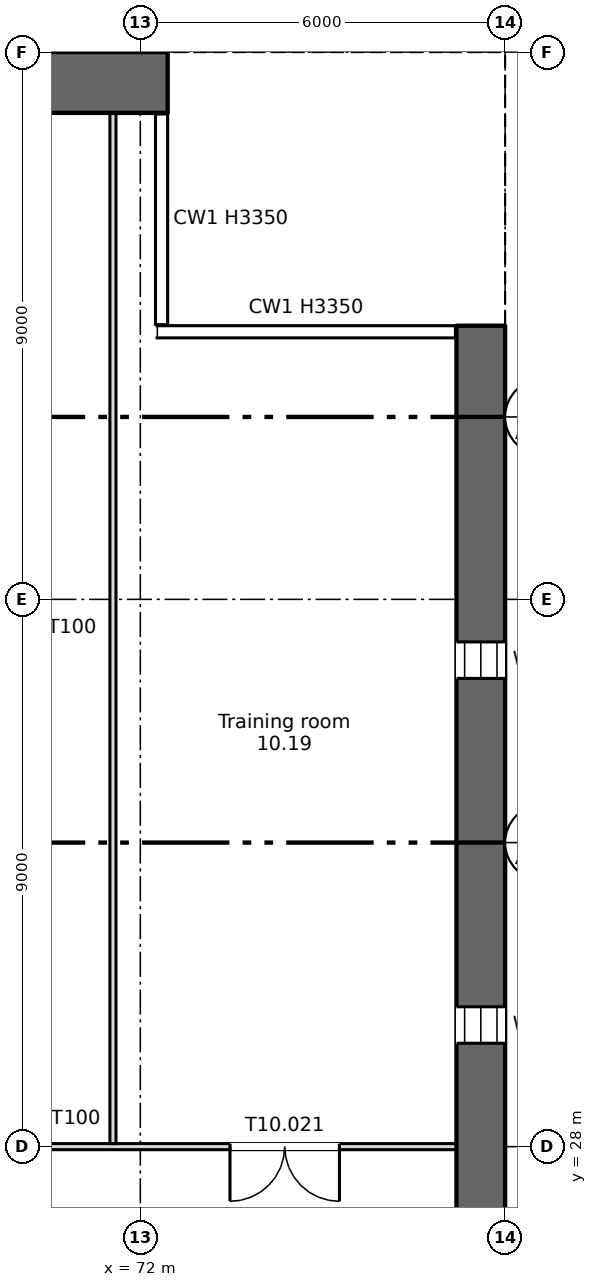
"""IFC4 building model, lengths in metres.
Left out: names, types, materials, properties, quantities, classifications, styles, units other than length and angle.
Written with IfcOpenShell. Run it as: python <this file> out.ifc"""

import sys

from ifc_helpers import new_model, si_unit, direction, frame, frame_2d, origin, place, context, subcontext, project, spatial, rectangle, extrude, element, fill, save


model = new_model("IFC4")
c1 = context("Model", 3, precision=1e-05, world=origin(), true_north=direction((0.0, 1.0)))
c2 = subcontext(c1, "Body", "Model", "MODEL_VIEW")
j1 = project(units=[si_unit("LENGTHUNIT", "METRE"), si_unit("PLANEANGLEUNIT", "RADIAN")], contexts=[c1])
p1 = place(None, origin())
s1 = spatial("IfcSite", under=j1, at=p1, CompositionType="ELEMENT")
p2 = place(p1, origin())
s2 = spatial("IfcBuilding", under=s1, at=p2, CompositionType="ELEMENT")
p3 = place(p2, frame((0.0, 0.0, 45.0)))
s3 = spatial("IfcBuildingStorey", under=s2, at=p3, CompositionType="ELEMENT", Elevation=45.0)
p4 = place(p3, frame((77.6, 4.5, 0.0), z_axis=(0.0, 0.0, 1.0), x_axis=(0.0, 1.0, 0.0)))
e1 = element("IfcWall", 1, at=p4, inside=s3, PredefinedType="SHEAR", context=c2, shape_type="SweptSolid", body=[
    extrude(rectangle(XDim=37.0, YDim=0.8, at=frame_2d((18.5, 0.0))), origin(), (0.0, 0.0, 1.0), 3.35),
])
p5 = place(p4, frame((1.2, 0.0, 0.6)))
e2 = element("IfcOpeningElement", 2, at=p5, cuts=e1, PredefinedType="OPENING", context=c2, shape_type="SweptSolid", body=[
    extrude(rectangle(XDim=0.6, YDim=2.4, at=frame_2d((0.3, 1.2))), frame((0.0, 0.41, 0.0), z_axis=(0.0, -1.0, 0.0), x_axis=(1.0, 0.0, 0.0)), (0.0, 0.0, 1.0), 0.82),
])
p6 = place(p4, frame((7.2, 0.0, 0.6)))
e3 = element("IfcOpeningElement", 3, at=p6, cuts=e1, PredefinedType="OPENING", context=c2, shape_type="SweptSolid", body=[
    extrude(rectangle(XDim=0.6, YDim=2.4, at=frame_2d((0.3, 1.2))), frame((0.0, 0.41, 0.0), z_axis=(0.0, -1.0, 0.0), x_axis=(1.0, 0.0, 0.0)), (0.0, 0.0, 1.0), 0.82),
])
p7 = place(p4, frame((13.2, 0.0, 0.6)))
e4 = element("IfcOpeningElement", 4, at=p7, cuts=e1, PredefinedType="OPENING", context=c2, shape_type="SweptSolid", body=[
    extrude(rectangle(XDim=0.6, YDim=2.4, at=frame_2d((0.3, 1.2))), frame((0.0, 0.41, 0.0), z_axis=(0.0, -1.0, 0.0), x_axis=(1.0, 0.0, 0.0)), (0.0, 0.0, 1.0), 0.82),
])
p8 = place(p4, frame((19.2, 0.0, 0.6)))
e5 = element("IfcOpeningElement", 5, at=p8, cuts=e1, PredefinedType="OPENING", context=c2, shape_type="SweptSolid", body=[
    extrude(rectangle(XDim=0.6, YDim=2.4, at=frame_2d((0.3, 1.2))), frame((0.0, 0.41, 0.0), z_axis=(0.0, -1.0, 0.0), x_axis=(1.0, 0.0, 0.0)), (0.0, 0.0, 1.0), 0.82),
])
p9 = place(p4, frame((25.2, 0.0, 0.6)))
e6 = element("IfcOpeningElement", 6, at=p9, cuts=e1, PredefinedType="OPENING", context=c2, shape_type="SweptSolid", body=[
    extrude(rectangle(XDim=0.6, YDim=2.4, at=frame_2d((0.3, 1.2))), frame((0.0, 0.41, 0.0), z_axis=(0.0, -1.0, 0.0), x_axis=(1.0, 0.0, 0.0)), (0.0, 0.0, 1.0), 0.82),
])
p10 = place(p4, frame((31.2, 0.0, 0.6)))
e7 = element("IfcOpeningElement", 7, at=p10, cuts=e1, PredefinedType="OPENING", context=c2, shape_type="SweptSolid", body=[
    extrude(rectangle(XDim=0.6, YDim=2.4, at=frame_2d((0.3, 1.2))), frame((0.0, 0.41, 0.0), z_axis=(0.0, -1.0, 0.0), x_axis=(1.0, 0.0, 0.0)), (0.0, 0.0, 1.0), 0.82),
])
p11 = place(p3, frame((5.55, 45.5, 0.0), z_axis=(0.0, 0.0, 1.0), x_axis=(1.0, 0.0, 0.0)))
e8 = element("IfcWall", 8, at=p11, inside=s3, PredefinedType="SHEAR", context=c2, shape_type="SweptSolid", body=[
    extrude(rectangle(XDim=66.9, YDim=1.0, at=frame_2d((33.45, 0.0))), origin(), (0.0, 0.0, 1.0), 3.35),
])
p12 = place(p11, frame((1.2, 0.0, 0.6)))
e9 = element("IfcOpeningElement", 9, at=p12, cuts=e8, PredefinedType="OPENING", context=c2, shape_type="SweptSolid", body=[
    extrude(rectangle(XDim=0.6, YDim=2.4, at=frame_2d((0.3, 1.2))), frame((0.0, 0.51, 0.0), z_axis=(0.0, -1.0, 0.0), x_axis=(1.0, 0.0, 0.0)), (0.0, 0.0, 1.0), 1.02),
])
p13 = place(p11, frame((7.2, 0.0, 0.6)))
e10 = element("IfcOpeningElement", 10, at=p13, cuts=e8, PredefinedType="OPENING", context=c2, shape_type="SweptSolid", body=[
    extrude(rectangle(XDim=0.6, YDim=2.4, at=frame_2d((0.3, 1.2))), frame((0.0, 0.51, 0.0), z_axis=(0.0, -1.0, 0.0), x_axis=(1.0, 0.0, 0.0)), (0.0, 0.0, 1.0), 1.02),
])
p14 = place(p11, frame((55.2, 0.0, 0.6)))
e11 = element("IfcOpeningElement", 11, at=p14, cuts=e8, PredefinedType="OPENING", context=c2, shape_type="SweptSolid", body=[
    extrude(rectangle(XDim=0.6, YDim=2.4, at=frame_2d((0.3, 1.2))), frame((0.0, 0.51, 0.0), z_axis=(0.0, -1.0, 0.0), x_axis=(1.0, 0.0, 0.0)), (0.0, 0.0, 1.0), 1.02),
])
p15 = place(p11, frame((61.2, 0.0, 0.6)))
e12 = element("IfcOpeningElement", 12, at=p15, cuts=e8, PredefinedType="OPENING", context=c2, shape_type="SweptSolid", body=[
    extrude(rectangle(XDim=0.6, YDim=2.4, at=frame_2d((0.3, 1.2))), frame((0.0, 0.51, 0.0), z_axis=(0.0, -1.0, 0.0), x_axis=(1.0, 0.0, 0.0)), (0.0, 0.0, 1.0), 1.02),
])
p16 = place(p3, frame((64.5, 28.0, 0.0), z_axis=(0.0, 0.0, 1.0), x_axis=(1.0, 0.0, 0.0)))
e13 = element("IfcWall", 13, at=p16, inside=s3, PredefinedType="PARTITIONING", context=c2, shape_type="SweptSolid", body=[
    extrude(rectangle(XDim=12.7, YDim=0.1, at=frame_2d((6.35, 0.0))), origin(), (0.0, 0.0, 1.0), 3.35),
])
p17 = place(p16, frame((8.975, 0.0, 0.0)))
e14 = element("IfcOpeningElement", 14, at=p17, cuts=e13, PredefinedType="OPENING", context=c2, shape_type="SweptSolid", body=[
    extrude(rectangle(XDim=1.8, YDim=2.1, at=frame_2d((0.9, 1.05))), frame((0.0, 0.06, 0.0), z_axis=(0.0, -1.0, 0.0), x_axis=(1.0, 0.0, 0.0)), (0.0, 0.0, 1.0), 0.12),
])
p18 = place(p16, frame((2.625, 0.0, 0.0)))
e15 = element("IfcOpeningElement", 15, at=p18, cuts=e13, PredefinedType="OPENING", context=c2, shape_type="SweptSolid", body=[
    extrude(rectangle(XDim=1.8, YDim=2.1, at=frame_2d((0.9, 1.05))), frame((0.0, 0.06, 0.0), z_axis=(0.0, -1.0, 0.0), x_axis=(1.0, 0.0, 0.0)), (0.0, 0.0, 1.0), 0.12),
])
p19 = place(p3, frame((71.55, 28.05, 0.0), z_axis=(0.0, 0.0, 1.0), x_axis=(0.0, 1.0, 0.0)))
e16 = element("IfcWall", 16, at=p19, inside=s3, PredefinedType="PARTITIONING", context=c2, shape_type="SweptSolid", body=[
    extrude(rectangle(XDim=16.95, YDim=0.1, at=frame_2d((8.475, 0.0))), origin(), (0.0, 0.0, 1.0), 3.35),
])
p20 = place(p9, origin())
e17 = element("IfcWindow", 17, at=p20, inside=s3, PartitioningType="SINGLE_PANEL", PredefinedType="WINDOW", context=c2, shape_type="SweptSolid", body=[
    extrude(rectangle(XDim=0.6, YDim=2.4, at=frame_2d((0.3, 1.2))), frame((0.0, 0.03, 0.0), z_axis=(0.0, -1.0, 0.0), x_axis=(1.0, 0.0, 0.0)), (0.0, 0.0, 1.0), 0.06),
])
fill(e6, e17)
p21 = place(p10, origin())
e18 = element("IfcWindow", 18, at=p21, inside=s3, PartitioningType="SINGLE_PANEL", PredefinedType="WINDOW", context=c2, shape_type="SweptSolid", body=[
    extrude(rectangle(XDim=0.6, YDim=2.4, at=frame_2d((0.3, 1.2))), frame((0.0, 0.03, 0.0), z_axis=(0.0, -1.0, 0.0), x_axis=(1.0, 0.0, 0.0)), (0.0, 0.0, 1.0), 0.06),
])
fill(e7, e18)
p22 = place(p17, origin())
e19 = element("IfcDoor", 19, at=p22, inside=s3, OperationType="DOUBLE_DOOR_SINGLE_SWING", PredefinedType="DOOR", context=c2, shape_type="SweptSolid", body=[
    extrude(rectangle(XDim=1.8, YDim=2.1, at=frame_2d((0.9, 1.05))), frame((0.0, 0.025, 0.0), z_axis=(0.0, -1.0, 0.0), x_axis=(1.0, 0.0, 0.0)), (0.0, 0.0, 1.0), 0.05),
])
fill(e14, e19)
save(model, sys.argv[1])
